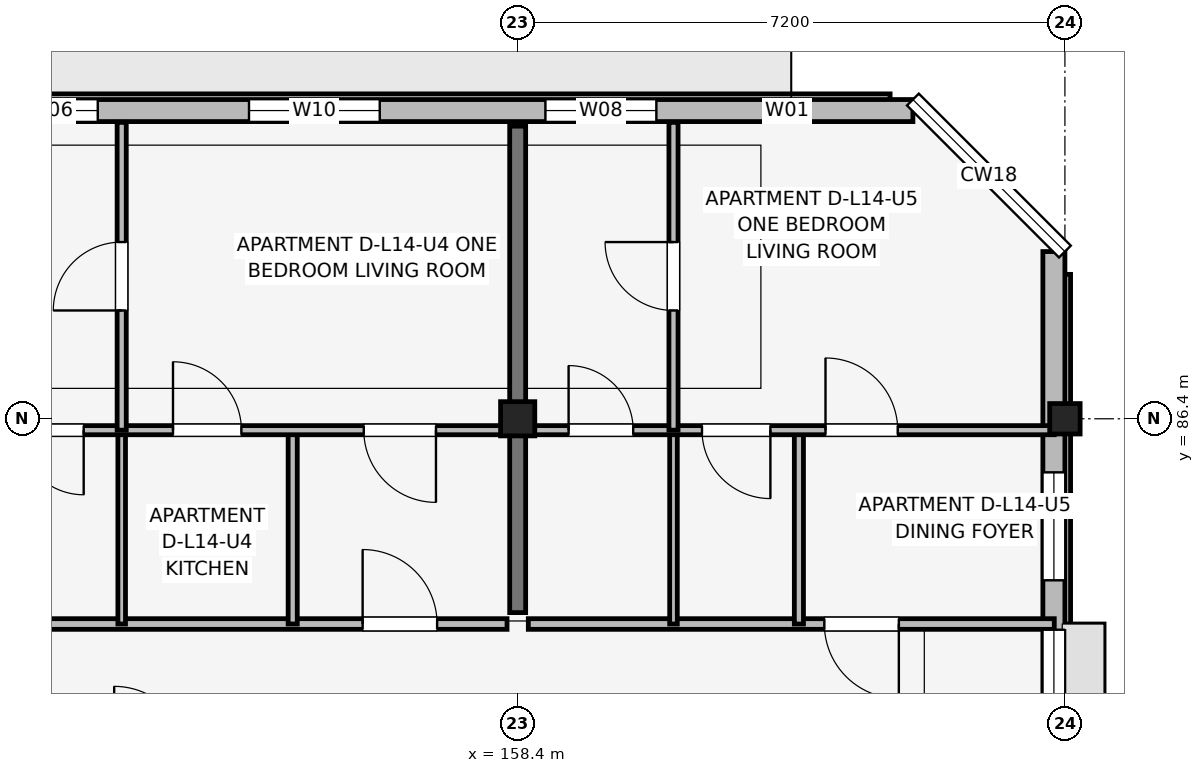
"""IFC4 building model, lengths in metres.
Left out: names, types, materials, properties, quantities, classifications, styles, units other than length and angle.
Written with IfcOpenShell. Run it as: python <this file> out.ifc"""

import sys

from ifc_helpers import new_model, si_unit, direction, frame, frame_2d, origin, origin_2d, place, context, subcontext, project, spatial, rectangle, extrude, element, fill, save


model = new_model("IFC4")
c1 = context("Model", 3, precision=1e-05, world=origin(), true_north=direction((0.0, 1.0)))
c2 = subcontext(c1, "Body", "Model", "MODEL_VIEW")
j1 = project(units=[si_unit("LENGTHUNIT", "METRE"), si_unit("PLANEANGLEUNIT", "RADIAN")], contexts=[c1])
p1 = place(None, origin())
s1 = spatial("IfcSite", under=j1, at=p1, CompositionType="ELEMENT")
p2 = place(p1, origin())
s2 = spatial("IfcBuilding", under=s1, at=p2, CompositionType="ELEMENT")
p3 = place(p2, frame((0.0, 0.0, 46.5)))
s3 = spatial("IfcBuildingStorey", under=s2, at=p3, CompositionType="ELEMENT", Elevation=46.5)
p4 = place(p3, frame((158.4, 86.4, 0.0), z_axis=(0.0, 0.0, 1.0), x_axis=(1.0, 0.0, 0.0)))
e1 = element("IfcColumn", 1, at=p4, inside=s3, PredefinedType="COLUMN", context=c2, shape_type="SweptSolid", body=[
    extrude(rectangle(XDim=0.45, YDim=0.45, at=origin_2d()), origin(), (0.0, 0.0, 1.0), 3.15),
])
p5 = place(p3, frame((165.6, 86.4, 0.0), z_axis=(0.0, 0.0, 1.0), x_axis=(1.0, 0.0, 0.0)))
e2 = element("IfcColumn", 2, at=p5, inside=s3, PredefinedType="COLUMN", context=c2, shape_type="SweptSolid", body=[
    extrude(rectangle(XDim=0.4, YDim=0.4, at=origin_2d()), origin(), (0.0, 0.0, 1.0), 3.15),
])
p6 = place(p3, frame((158.4, 83.85, 0.0), z_axis=(0.0, 0.0, 1.0), x_axis=(0.0, 1.0, 0.0)))
e3 = element("IfcWall", 3, at=p6, inside=s3, PredefinedType="SHEAR", context=c2, shape_type="SweptSolid", body=[
    extrude(rectangle(XDim=6.4, YDim=0.21, at=frame_2d((3.2, 0.0))), origin(), (0.0, 0.0, 1.0), 3.15),
])
p7 = place(p3, frame((165.455, 74.0, 0.0), z_axis=(0.0, 0.0, 1.0), x_axis=(0.0, 1.0, 0.0)))
e4 = element("IfcWall", 4, at=p7, inside=s3, PredefinedType="SOLIDWALL", context=c2, shape_type="SweptSolid", body=[
    extrude(rectangle(XDim=14.6, YDim=0.29, at=frame_2d((7.3, 0.0))), origin(), (0.0, 0.0, 1.0), 2.51),
])
p8 = place(p7, frame((7.975, 0.0, 1.05)))
e5 = element("IfcOpeningElement", 5, at=p8, cuts=e4, PredefinedType="OPENING", context=c2, shape_type="SweptSolid", body=[
    extrude(rectangle(XDim=1.65, YDim=1.15, at=frame_2d((0.825, 0.575))), frame((0.0, 0.155, 0.0), z_axis=(0.0, -1.0, 0.0), x_axis=(1.0, 0.0, 0.0)), (0.0, 0.0, 1.0), 0.31),
])
p9 = place(p7, frame((10.275, 0.0, 0.75)))
e6 = element("IfcOpeningElement", 6, at=p9, cuts=e4, PredefinedType="OPENING", context=c2, shape_type="SweptSolid", body=[
    extrude(rectangle(XDim=1.42, YDim=1.6, at=frame_2d((0.71, 0.8))), frame((0.0, 0.155, 0.0), z_axis=(0.0, -1.0, 0.0), x_axis=(1.0, 0.0, 0.0)), (0.0, 0.0, 1.0), 0.31),
])
p10 = place(p3, frame((163.6, 90.455, 0.0), z_axis=(0.0, 0.0, 1.0), x_axis=(-1.0, 0.0, 0.0)))
e7 = element("IfcWall", 7, at=p10, inside=s3, PredefinedType="SOLIDWALL", context=c2, shape_type="SweptSolid", body=[
    extrude(rectangle(XDim=32.0, YDim=0.29, at=frame_2d((16.0, 0.0))), origin(), (0.0, 0.0, 1.0), 2.48),
])
p11 = place(p10, frame((15.45, 0.0, 0.0), z_axis=(0.0, 0.0, 1.0), x_axis=(-1.0, 0.0, 0.0)))
e8 = element("IfcOpeningElement", 8, at=p11, cuts=e7, PredefinedType="OPENING", context=c2, shape_type="SweptSolid", body=[
    extrude(rectangle(XDim=2.1, YDim=2.2, at=frame_2d((1.05, 1.1))), frame((0.0, 0.155, 0.0), z_axis=(0.0, -1.0, 0.0), x_axis=(1.0, 0.0, 0.0)), (0.0, 0.0, 1.0), 0.31),
])
p12 = place(p10, frame((29.285, 0.0, 0.7)))
e9 = element("IfcOpeningElement", 9, at=p12, cuts=e7, PredefinedType="OPENING", context=c2, shape_type="SweptSolid", body=[
    extrude(rectangle(XDim=1.86, YDim=1.6, at=frame_2d((0.93, 0.8))), frame((0.0, 0.155, 0.0), z_axis=(0.0, -1.0, 0.0), x_axis=(1.0, 0.0, 0.0)), (0.0, 0.0, 1.0), 0.31),
])
p13 = place(p10, frame((27.405, 0.0, 0.75)))
e10 = element("IfcOpeningElement", 10, at=p13, cuts=e7, PredefinedType="OPENING", context=c2, shape_type="SweptSolid", body=[
    extrude(rectangle(XDim=0.72, YDim=1.35, at=frame_2d((0.36, 0.675))), frame((0.0, 0.155, 0.0), z_axis=(0.0, -1.0, 0.0), x_axis=(1.0, 0.0, 0.0)), (0.0, 0.0, 1.0), 0.31),
])
p14 = place(p10, frame((25.31, 0.0, 0.75)))
e11 = element("IfcOpeningElement", 11, at=p14, cuts=e7, PredefinedType="OPENING", context=c2, shape_type="SweptSolid", body=[
    extrude(rectangle(XDim=0.85, YDim=1.4, at=frame_2d((0.425, 0.7))), frame((0.0, 0.155, 0.0), z_axis=(0.0, -1.0, 0.0), x_axis=(1.0, 0.0, 0.0)), (0.0, 0.0, 1.0), 0.31),
])
p15 = place(p10, frame((21.125, 0.0, 0.7)))
e12 = element("IfcOpeningElement", 12, at=p15, cuts=e7, PredefinedType="OPENING", context=c2, shape_type="SweptSolid", body=[
    extrude(rectangle(XDim=2.3, YDim=1.65, at=frame_2d((1.15, 0.825))), frame((0.0, 0.155, 0.0), z_axis=(0.0, -1.0, 0.0), x_axis=(1.0, 0.0, 0.0)), (0.0, 0.0, 1.0), 0.31),
])
p16 = place(p10, frame((16.335, 0.0, 0.7)))
e13 = element("IfcOpeningElement", 13, at=p16, cuts=e7, PredefinedType="OPENING", context=c2, shape_type="SweptSolid", body=[
    extrude(rectangle(XDim=2.45, YDim=1.65, at=frame_2d((1.225, 0.825))), frame((0.0, 0.155, 0.0), z_axis=(0.0, -1.0, 0.0), x_axis=(1.0, 0.0, 0.0)), (0.0, 0.0, 1.0), 0.31),
])
p17 = place(p10, frame((10.725, 0.0, 0.75)))
e14 = element("IfcOpeningElement", 14, at=p17, cuts=e7, PredefinedType="OPENING", context=c2, shape_type="SweptSolid", body=[
    extrude(rectangle(XDim=1.22, YDim=1.5, at=frame_2d((0.61, 0.75))), frame((0.0, 0.155, 0.0), z_axis=(0.0, -1.0, 0.0), x_axis=(1.0, 0.0, 0.0)), (0.0, 0.0, 1.0), 0.31),
])
p18 = place(p10, frame((7.015, 0.0, 0.7)))
e15 = element("IfcOpeningElement", 15, at=p18, cuts=e7, PredefinedType="OPENING", context=c2, shape_type="SweptSolid", body=[
    extrude(rectangle(XDim=1.72, YDim=1.6, at=frame_2d((0.86, 0.8))), frame((0.0, 0.155, 0.0), z_axis=(0.0, -1.0, 0.0), x_axis=(1.0, 0.0, 0.0)), (0.0, 0.0, 1.0), 0.31),
])
p19 = place(p10, frame((3.375, 0.0, 0.75)))
e16 = element("IfcOpeningElement", 16, at=p19, cuts=e7, PredefinedType="OPENING", context=c2, shape_type="SweptSolid", body=[
    extrude(rectangle(XDim=1.46, YDim=1.55, at=frame_2d((0.73, 0.775))), frame((0.0, 0.155, 0.0), z_axis=(0.0, -1.0, 0.0), x_axis=(1.0, 0.0, 0.0)), (0.0, 0.0, 1.0), 0.31),
])
p20 = place(p10, frame((1.355, 0.0, 0.75)))
e17 = element("IfcOpeningElement", 17, at=p20, cuts=e7, PredefinedType="OPENING", context=c2, shape_type="SweptSolid", body=[
    extrude(rectangle(XDim=0.6, YDim=1.25, at=frame_2d((0.3, 0.625))), frame((0.0, 0.155, 0.0), z_axis=(0.0, -1.0, 0.0), x_axis=(1.0, 0.0, 0.0)), (0.0, 0.0, 1.0), 0.31),
])
p21 = place(p3, frame((151.34, 83.7, 0.0), z_axis=(0.0, 0.0, 1.0), x_axis=(1.0, 0.0, 0.0)))
e18 = element("IfcWall", 18, at=p21, inside=s3, PredefinedType="PARTITIONING", context=c2, shape_type="SweptSolid", body=[
    extrude(rectangle(XDim=6.92, YDim=0.14, at=frame_2d((3.46, 0.0))), origin(), (0.0, 0.0, 1.0), 2.38),
])
p22 = place(p21, frame((5.02, 0.0, 0.0)))
e19 = element("IfcOpeningElement", 19, at=p22, cuts=e18, PredefinedType="OPENING", context=c2, shape_type="SweptSolid", body=[
    extrude(rectangle(XDim=0.98, YDim=2.1, at=frame_2d((0.49, 1.05))), frame((0.0, 0.08, 0.0), z_axis=(0.0, -1.0, 0.0), x_axis=(1.0, 0.0, 0.0)), (0.0, 0.0, 1.0), 0.16),
])
p23 = place(p3, frame((153.19, 83.7, 0.0), z_axis=(0.0, 0.0, 1.0), x_axis=(0.0, 1.0, 0.0)))
e20 = element("IfcWall", 20, at=p23, inside=s3, PredefinedType="PARTITIONING", context=c2, shape_type="SweptSolid", body=[
    extrude(rectangle(XDim=2.55, YDim=0.1, at=frame_2d((1.275, 0.0))), origin(), (0.0, 0.0, 1.0), 2.38),
])
p24 = place(p3, frame((155.44, 83.7, 0.0), z_axis=(0.0, 0.0, 1.0), x_axis=(0.0, 1.0, 0.0)))
e21 = element("IfcWall", 21, at=p24, inside=s3, PredefinedType="PARTITIONING", context=c2, shape_type="SweptSolid", body=[
    extrude(rectangle(XDim=2.55, YDim=0.12, at=frame_2d((1.275, 0.0))), origin(), (0.0, 0.0, 1.0), 2.38),
])
p25 = place(p3, frame((151.34, 86.25, 0.0), z_axis=(0.0, 0.0, 1.0), x_axis=(1.0, 0.0, 0.0)))
e22 = element("IfcWall", 22, at=p25, inside=s3, PredefinedType="PARTITIONING", context=c2, shape_type="SweptSolid", body=[
    extrude(rectangle(XDim=6.92, YDim=0.12, at=frame_2d((3.46, 0.0))), origin(), (0.0, 0.0, 1.0), 2.38),
])
p26 = place(p25, frame((1.35, 0.0, 0.0), z_axis=(0.0, 0.0, 1.0), x_axis=(-1.0, 0.0, 0.0)))
e23 = element("IfcOpeningElement", 23, at=p26, cuts=e22, PredefinedType="OPENING", context=c2, shape_type="SweptSolid", body=[
    extrude(rectangle(XDim=0.85, YDim=2.08, at=frame_2d((0.425, 1.04))), frame((0.0, 0.07, 0.0), z_axis=(0.0, -1.0, 0.0), x_axis=(1.0, 0.0, 0.0)), (0.0, 0.0, 1.0), 0.14),
])
p27 = place(p25, frame((2.525, 0.0, 0.0)))
e24 = element("IfcOpeningElement", 24, at=p27, cuts=e22, PredefinedType="OPENING", context=c2, shape_type="SweptSolid", body=[
    extrude(rectangle(XDim=0.9, YDim=2.08, at=frame_2d((0.45, 1.04))), frame((0.0, 0.07, 0.0), z_axis=(0.0, -1.0, 0.0), x_axis=(1.0, 0.0, 0.0)), (0.0, 0.0, 1.0), 0.14),
])
p28 = place(p25, frame((5.985, 0.0, 0.0), z_axis=(0.0, 0.0, 1.0), x_axis=(-1.0, 0.0, 0.0)))
e25 = element("IfcOpeningElement", 25, at=p28, cuts=e22, PredefinedType="OPENING", context=c2, shape_type="SweptSolid", body=[
    extrude(rectangle(XDim=0.95, YDim=2.08, at=frame_2d((0.475, 1.04))), frame((0.0, 0.07, 0.0), z_axis=(0.0, -1.0, 0.0), x_axis=(1.0, 0.0, 0.0)), (0.0, 0.0, 1.0), 0.14),
])
p29 = place(p3, frame((153.19, 86.25, 0.0), z_axis=(0.0, 0.0, 1.0), x_axis=(0.0, 1.0, 0.0)))
e26 = element("IfcWall", 26, at=p29, inside=s3, PredefinedType="PARTITIONING", context=c2, shape_type="SweptSolid", body=[
    extrude(rectangle(XDim=4.05, YDim=0.12, at=frame_2d((2.025, 0.0))), origin(), (0.0, 0.0, 1.0), 2.38),
])
p30 = place(p29, frame((1.575, 0.0, 0.0)))
e27 = element("IfcOpeningElement", 27, at=p30, cuts=e26, PredefinedType="OPENING", context=c2, shape_type="SweptSolid", body=[
    extrude(rectangle(XDim=0.9, YDim=2.08, at=frame_2d((0.45, 1.04))), frame((0.0, 0.07, 0.0), z_axis=(0.0, -1.0, 0.0), x_axis=(1.0, 0.0, 0.0)), (0.0, 0.0, 1.0), 0.14),
])
p31 = place(p3, frame((158.54, 83.7, 0.0), z_axis=(0.0, 0.0, 1.0), x_axis=(1.0, 0.0, 0.0)))
e28 = element("IfcWall", 28, at=p31, inside=s3, PredefinedType="PARTITIONING", context=c2, shape_type="SweptSolid", body=[
    extrude(rectangle(XDim=6.92, YDim=0.14, at=frame_2d((3.46, 0.0))), origin(), (0.0, 0.0, 1.0), 2.38),
])
p32 = place(p31, frame((4.875, 0.0, 0.0), z_axis=(0.0, 0.0, 1.0), x_axis=(-1.0, 0.0, 0.0)))
e29 = element("IfcOpeningElement", 29, at=p32, cuts=e28, PredefinedType="OPENING", context=c2, shape_type="SweptSolid", body=[
    extrude(rectangle(XDim=0.98, YDim=2.1, at=frame_2d((0.49, 1.05))), frame((0.0, 0.08, 0.0), z_axis=(0.0, -1.0, 0.0), x_axis=(1.0, 0.0, 0.0)), (0.0, 0.0, 1.0), 0.16),
])
p33 = place(p3, frame((160.45, 83.7, 0.0), z_axis=(0.0, 0.0, 1.0), x_axis=(0.0, 1.0, 0.0)))
e30 = element("IfcWall", 30, at=p33, inside=s3, PredefinedType="PARTITIONING", context=c2, shape_type="SweptSolid", body=[
    extrude(rectangle(XDim=2.55, YDim=0.1, at=frame_2d((1.275, 0.0))), origin(), (0.0, 0.0, 1.0), 2.38),
])
p34 = place(p3, frame((162.1, 83.7, 0.0), z_axis=(0.0, 0.0, 1.0), x_axis=(0.0, 1.0, 0.0)))
e31 = element("IfcWall", 31, at=p34, inside=s3, PredefinedType="PARTITIONING", context=c2, shape_type="SweptSolid", body=[
    extrude(rectangle(XDim=2.55, YDim=0.12, at=frame_2d((1.275, 0.0))), origin(), (0.0, 0.0, 1.0), 2.38),
])
p35 = place(p3, frame((158.54, 86.25, 0.0), z_axis=(0.0, 0.0, 1.0), x_axis=(1.0, 0.0, 0.0)))
e32 = element("IfcWall", 32, at=p35, inside=s3, PredefinedType="PARTITIONING", context=c2, shape_type="SweptSolid", body=[
    extrude(rectangle(XDim=6.92, YDim=0.12, at=frame_2d((3.46, 0.0))), origin(), (0.0, 0.0, 1.0), 2.38),
])
p36 = place(p35, frame((0.53, 0.0, 0.0)))
e33 = element("IfcOpeningElement", 33, at=p36, cuts=e32, PredefinedType="OPENING", context=c2, shape_type="SweptSolid", body=[
    extrude(rectangle(XDim=0.85, YDim=2.08, at=frame_2d((0.425, 1.04))), frame((0.0, 0.07, 0.0), z_axis=(0.0, -1.0, 0.0), x_axis=(1.0, 0.0, 0.0)), (0.0, 0.0, 1.0), 0.14),
])
p37 = place(p35, frame((3.185, 0.0, 0.0), z_axis=(0.0, 0.0, 1.0), x_axis=(-1.0, 0.0, 0.0)))
e34 = element("IfcOpeningElement", 34, at=p37, cuts=e32, PredefinedType="OPENING", context=c2, shape_type="SweptSolid", body=[
    extrude(rectangle(XDim=0.9, YDim=2.08, at=frame_2d((0.45, 1.04))), frame((0.0, 0.07, 0.0), z_axis=(0.0, -1.0, 0.0), x_axis=(1.0, 0.0, 0.0)), (0.0, 0.0, 1.0), 0.14),
])
p38 = place(p35, frame((3.91, 0.0, 0.0)))
e35 = element("IfcOpeningElement", 35, at=p38, cuts=e32, PredefinedType="OPENING", context=c2, shape_type="SweptSolid", body=[
    extrude(rectangle(XDim=0.95, YDim=2.08, at=frame_2d((0.475, 1.04))), frame((0.0, 0.07, 0.0), z_axis=(0.0, -1.0, 0.0), x_axis=(1.0, 0.0, 0.0)), (0.0, 0.0, 1.0), 0.14),
])
p39 = place(p3, frame((160.45, 86.25, 0.0), z_axis=(0.0, 0.0, 1.0), x_axis=(0.0, 1.0, 0.0)))
e36 = element("IfcWall", 36, at=p39, inside=s3, PredefinedType="PARTITIONING", context=c2, shape_type="SweptSolid", body=[
    extrude(rectangle(XDim=4.05, YDim=0.12, at=frame_2d((2.025, 0.0))), origin(), (0.0, 0.0, 1.0), 2.38),
])
p40 = place(p39, frame((1.575, 0.0, 0.0)))
e37 = element("IfcOpeningElement", 37, at=p40, cuts=e36, PredefinedType="OPENING", context=c2, shape_type="SweptSolid", body=[
    extrude(rectangle(XDim=0.9, YDim=2.08, at=frame_2d((0.45, 1.04))), frame((0.0, 0.07, 0.0), z_axis=(0.0, -1.0, 0.0), x_axis=(1.0, 0.0, 0.0)), (0.0, 0.0, 1.0), 0.14),
])
p41 = place(p17, origin())
e38 = element("IfcWindow", 38, at=p41, inside=s3, PartitioningType="SINGLE_PANEL", PredefinedType="WINDOW", context=c2, shape_type="SweptSolid", body=[
    extrude(rectangle(XDim=1.22, YDim=1.5, at=frame_2d((0.61, 0.75))), frame((0.0, 0.03, 0.0), z_axis=(0.0, -1.0, 0.0), x_axis=(1.0, 0.0, 0.0)), (0.0, 0.0, 1.0), 0.06),
])
fill(e14, e38)
p42 = place(p18, origin())
e39 = element("IfcWindow", 39, at=p42, inside=s3, PartitioningType="SINGLE_PANEL", PredefinedType="WINDOW", context=c2, shape_type="SweptSolid", body=[
    extrude(rectangle(XDim=1.72, YDim=1.6, at=frame_2d((0.86, 0.8))), frame((0.0, 0.03, 0.0), z_axis=(0.0, -1.0, 0.0), x_axis=(1.0, 0.0, 0.0)), (0.0, 0.0, 1.0), 0.06),
])
fill(e15, e39)
p43 = place(p19, origin())
e40 = element("IfcWindow", 40, at=p43, inside=s3, PartitioningType="SINGLE_PANEL", PredefinedType="WINDOW", context=c2, shape_type="SweptSolid", body=[
    extrude(rectangle(XDim=1.46, YDim=1.55, at=frame_2d((0.73, 0.775))), frame((0.0, 0.03, 0.0), z_axis=(0.0, -1.0, 0.0), x_axis=(1.0, 0.0, 0.0)), (0.0, 0.0, 1.0), 0.06),
])
fill(e16, e40)
p44 = place(p20, origin())
e41 = element("IfcWindow", 41, at=p44, inside=s3, PartitioningType="SINGLE_PANEL", PredefinedType="WINDOW", context=c2, shape_type="SweptSolid", body=[
    extrude(rectangle(XDim=0.6, YDim=1.25, at=frame_2d((0.3, 0.625))), frame((0.0, 0.03, 0.0), z_axis=(0.0, -1.0, 0.0), x_axis=(1.0, 0.0, 0.0)), (0.0, 0.0, 1.0), 0.06),
])
fill(e17, e41)
p45 = place(p8, origin())
e42 = element("IfcWindow", 42, at=p45, inside=s3, PartitioningType="SINGLE_PANEL", PredefinedType="WINDOW", context=c2, shape_type="SweptSolid", body=[
    extrude(rectangle(XDim=1.65, YDim=1.15, at=frame_2d((0.825, 0.575))), frame((0.0, 0.03, 0.0), z_axis=(0.0, -1.0, 0.0), x_axis=(1.0, 0.0, 0.0)), (0.0, 0.0, 1.0), 0.06),
])
fill(e5, e42)
p46 = place(p9, origin())
e43 = element("IfcWindow", 43, at=p46, inside=s3, PartitioningType="SINGLE_PANEL", PredefinedType="WINDOW", context=c2, shape_type="SweptSolid", body=[
    extrude(rectangle(XDim=1.42, YDim=1.6, at=frame_2d((0.71, 0.8))), frame((0.0, 0.03, 0.0), z_axis=(0.0, -1.0, 0.0), x_axis=(1.0, 0.0, 0.0)), (0.0, 0.0, 1.0), 0.06),
])
fill(e6, e43)
p47 = place(p22, origin())
e44 = element("IfcDoor", 44, at=p47, inside=s3, OperationType="SINGLE_SWING_LEFT", PredefinedType="DOOR", context=c2, shape_type="SweptSolid", body=[
    extrude(rectangle(XDim=0.98, YDim=2.1, at=frame_2d((0.49, 1.05))), frame((0.0, 0.025, 0.0), z_axis=(0.0, -1.0, 0.0), x_axis=(1.0, 0.0, 0.0)), (0.0, 0.0, 1.0), 0.05),
])
fill(e19, e44)
p48 = place(p26, origin())
e45 = element("IfcDoor", 45, at=p48, inside=s3, OperationType="SINGLE_SWING_RIGHT", PredefinedType="DOOR", context=c2, shape_type="SweptSolid", body=[
    extrude(rectangle(XDim=0.85, YDim=2.08, at=frame_2d((0.425, 1.04))), frame((0.0, 0.025, 0.0), z_axis=(0.0, -1.0, 0.0), x_axis=(1.0, 0.0, 0.0)), (0.0, 0.0, 1.0), 0.05),
])
fill(e23, e45)
p49 = place(p27, origin())
e46 = element("IfcDoor", 46, at=p49, inside=s3, OperationType="SINGLE_SWING_LEFT", PredefinedType="DOOR", context=c2, shape_type="SweptSolid", body=[
    extrude(rectangle(XDim=0.9, YDim=2.08, at=frame_2d((0.45, 1.04))), frame((0.0, 0.025, 0.0), z_axis=(0.0, -1.0, 0.0), x_axis=(1.0, 0.0, 0.0)), (0.0, 0.0, 1.0), 0.05),
])
fill(e24, e46)
p50 = place(p28, origin())
e47 = element("IfcDoor", 47, at=p50, inside=s3, OperationType="SINGLE_SWING_RIGHT", PredefinedType="DOOR", context=c2, shape_type="SweptSolid", body=[
    extrude(rectangle(XDim=0.95, YDim=2.08, at=frame_2d((0.475, 1.04))), frame((0.0, 0.025, 0.0), z_axis=(0.0, -1.0, 0.0), x_axis=(1.0, 0.0, 0.0)), (0.0, 0.0, 1.0), 0.05),
])
fill(e25, e47)
p51 = place(p30, origin())
e48 = element("IfcDoor", 48, at=p51, inside=s3, OperationType="SINGLE_SWING_LEFT", PredefinedType="DOOR", context=c2, shape_type="SweptSolid", body=[
    extrude(rectangle(XDim=0.9, YDim=2.08, at=frame_2d((0.45, 1.04))), frame((0.0, 0.025, 0.0), z_axis=(0.0, -1.0, 0.0), x_axis=(1.0, 0.0, 0.0)), (0.0, 0.0, 1.0), 0.05),
])
fill(e27, e48)
p52 = place(p32, origin())
e49 = element("IfcDoor", 49, at=p52, inside=s3, OperationType="SINGLE_SWING_RIGHT", PredefinedType="DOOR", context=c2, shape_type="SweptSolid", body=[
    extrude(rectangle(XDim=0.98, YDim=2.1, at=frame_2d((0.49, 1.05))), frame((0.0, 0.025, 0.0), z_axis=(0.0, -1.0, 0.0), x_axis=(1.0, 0.0, 0.0)), (0.0, 0.0, 1.0), 0.05),
])
fill(e29, e49)
p53 = place(p36, origin())
e50 = element("IfcDoor", 50, at=p53, inside=s3, OperationType="SINGLE_SWING_LEFT", PredefinedType="DOOR", context=c2, shape_type="SweptSolid", body=[
    extrude(rectangle(XDim=0.85, YDim=2.08, at=frame_2d((0.425, 1.04))), frame((0.0, 0.025, 0.0), z_axis=(0.0, -1.0, 0.0), x_axis=(1.0, 0.0, 0.0)), (0.0, 0.0, 1.0), 0.05),
])
fill(e33, e50)
p54 = place(p37, origin())
e51 = element("IfcDoor", 51, at=p54, inside=s3, OperationType="SINGLE_SWING_RIGHT", PredefinedType="DOOR", context=c2, shape_type="SweptSolid", body=[
    extrude(rectangle(XDim=0.9, YDim=2.08, at=frame_2d((0.45, 1.04))), frame((0.0, 0.025, 0.0), z_axis=(0.0, -1.0, 0.0), x_axis=(1.0, 0.0, 0.0)), (0.0, 0.0, 1.0), 0.05),
])
fill(e34, e51)
p55 = place(p38, origin())
e52 = element("IfcDoor", 52, at=p55, inside=s3, OperationType="SINGLE_SWING_LEFT", PredefinedType="DOOR", context=c2, shape_type="SweptSolid", body=[
    extrude(rectangle(XDim=0.95, YDim=2.08, at=frame_2d((0.475, 1.04))), frame((0.0, 0.025, 0.0), z_axis=(0.0, -1.0, 0.0), x_axis=(1.0, 0.0, 0.0)), (0.0, 0.0, 1.0), 0.05),
])
fill(e35, e52)
p56 = place(p40, origin())
e53 = element("IfcDoor", 53, at=p56, inside=s3, OperationType="SINGLE_SWING_RIGHT", PredefinedType="DOOR", context=c2, shape_type="SweptSolid", body=[
    extrude(rectangle(XDim=0.9, YDim=2.08, at=frame_2d((0.45, 1.04))), frame((0.0, 0.025, 0.0), z_axis=(0.0, -1.0, 0.0), x_axis=(1.0, 0.0, 0.0)), (0.0, 0.0, 1.0), 0.05),
])
fill(e37, e53)
save(model, sys.argv[1])
